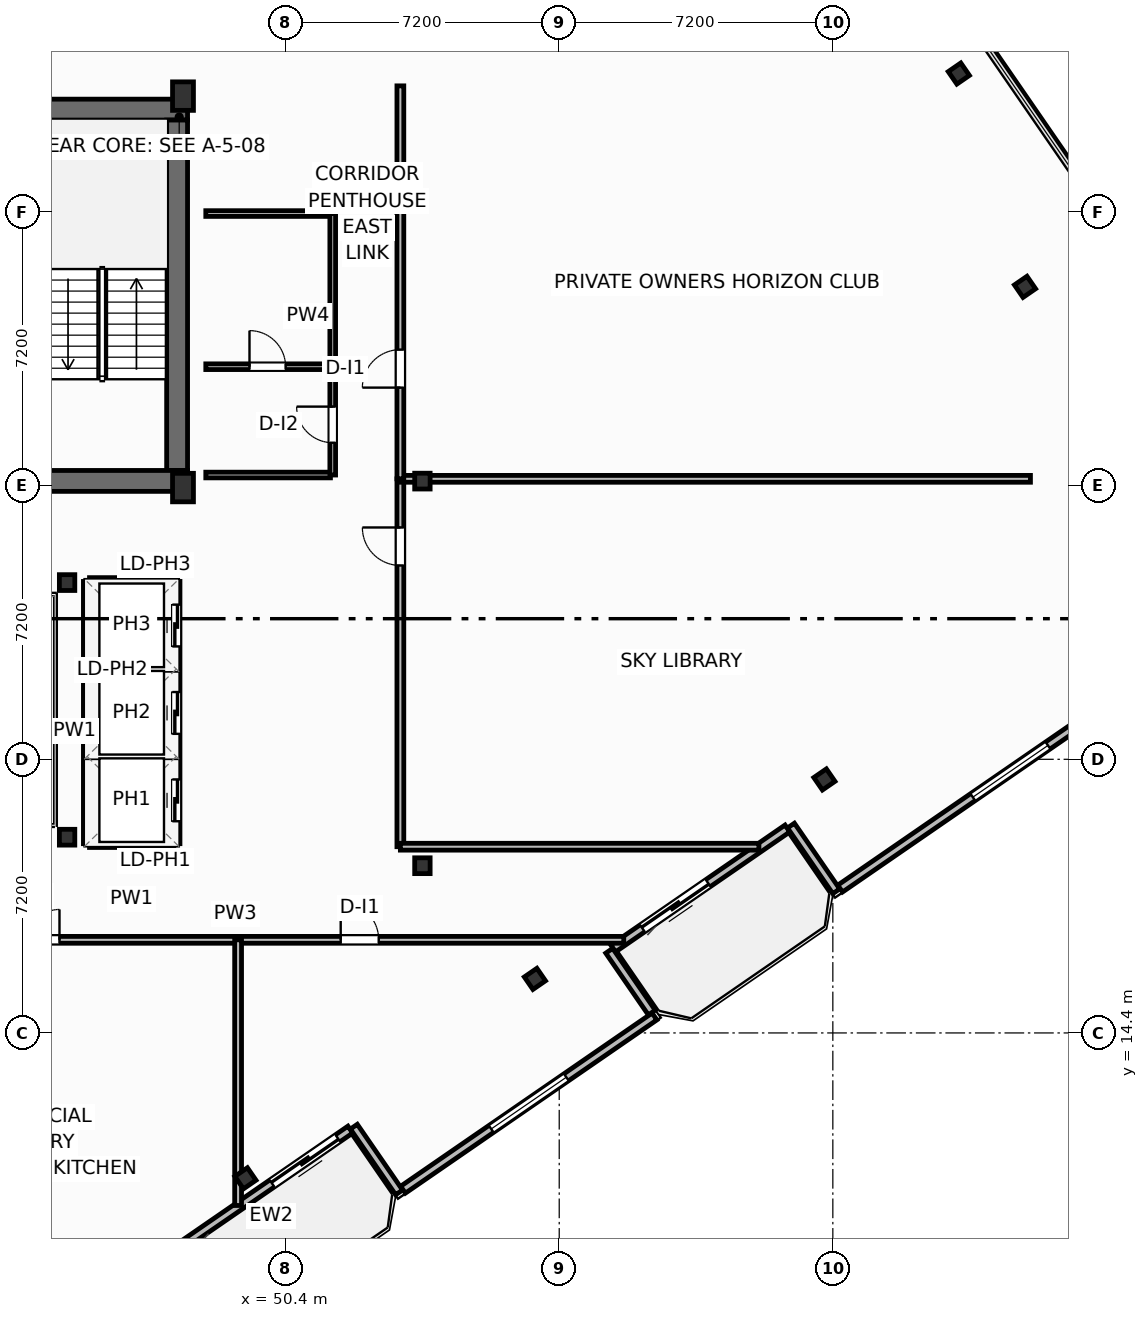
"""IFC4 building model, lengths in metres.
Left out: names, types, materials, properties, quantities, classifications, styles, units other than length and angle.
Written with IfcOpenShell. Run it as: python <this file> out.ifc"""

import sys

from ifc_helpers import new_model, si_unit, direction, frame, frame_2d, origin, origin_2d, place, context, subcontext, project, spatial, rectangle, i_section, extrude, element, fill, save


model = new_model("IFC4")
c1 = context("Model", 3, precision=1e-05, world=origin(), true_north=direction((0.0, 1.0)))
c2 = subcontext(c1, "Body", "Model", "MODEL_VIEW")
j1 = project(units=[si_unit("LENGTHUNIT", "METRE"), si_unit("PLANEANGLEUNIT", "RADIAN")], contexts=[c1])
p1 = place(None, origin())
s1 = spatial("IfcSite", under=j1, at=p1, CompositionType="ELEMENT")
p2 = place(p1, origin())
s2 = spatial("IfcBuilding", under=s1, at=p2, CompositionType="ELEMENT")
p3 = place(p2, frame((0.0, 0.0, 287.8)))
s3 = spatial("IfcBuildingStorey", under=s2, at=p3, CompositionType="ELEMENT", Elevation=287.8)
for number, where, z_axis, x_axis in (
    (1, (47.7, 28.75, 0.0), (0.0, 0.0, 1.0), (1.0, 0.0, 0.0)),
    (2, (47.7, 39.05, 0.0), (0.0, 0.0, 1.0), (1.0, 0.0, 0.0)),
):
    element("IfcColumn", number, at=place(p3, frame(where, z_axis=z_axis, x_axis=x_axis)), inside=s3, PredefinedType="COLUMN", context=c2, shape_type="SweptSolid", body=[
        extrude(rectangle(XDim=0.55, YDim=0.75, at=origin_2d()), origin(), (0.0, 0.0, 1.0), 3.7),
    ])
for number, where, z_axis, x_axis in (
    (3, (44.65, 19.55, 0.0), (0.0, 0.0, 1.0), (1.0, 0.0, 0.0)),
    (4, (44.65, 26.25, 0.0), (0.0, 0.0, 1.0), (1.0, 0.0, 0.0)),
    (5, (54.0, 18.8, 0.0), (0.0, 0.0, 1.0), (1.0, 0.0, 0.0)),
    (6, (54.0, 28.92, 0.0), (0.0, 0.0, 1.0), (1.0, 0.0, 0.0)),
):
    element("IfcColumn", number, at=place(p3, frame(where, z_axis=z_axis, x_axis=x_axis)), inside=s3, PredefinedType="COLUMN", context=c2, shape_type="SweptSolid", body=[
        extrude(i_section(OverallWidth=0.406, OverallDepth=0.416, WebThickness=0.03, FlangeThickness=0.048, FilletRadius=0.025, at=origin_2d()), origin(), (0.0, 0.0, 1.0), 3.7),
    ])
p4 = place(p3, frame((30.58, 38.695, 0.0), z_axis=(0.0, 0.0, 1.0), x_axis=(1.0, 0.0, 0.0)))
e7 = element("IfcWall", 7, at=p4, inside=s3, PredefinedType="SHEAR", context=c2, shape_type="SweptSolid", body=[
    extrude(rectangle(XDim=17.24, YDim=0.55, at=frame_2d((8.62, 0.0))), origin(), (0.0, 0.0, 1.0), 3.38),
])
p5 = place(p3, frame((47.545, 29.2, 0.0), z_axis=(0.0, 0.0, 1.0), x_axis=(0.0, 1.0, 0.0)))
e8 = element("IfcWall", 8, at=p5, inside=s3, PredefinedType="SHEAR", context=c2, shape_type="SweptSolid", body=[
    extrude(rectangle(XDim=9.22, YDim=0.55, at=frame_2d((4.61, 0.0))), origin(), (0.0, 0.0, 1.0), 3.38),
])
p6 = place(p3, frame((43.6, 28.925, 0.0), z_axis=(0.0, 0.0, 1.0), x_axis=(1.0, 0.0, 0.0)))
e9 = element("IfcWall", 9, at=p6, inside=s3, PredefinedType="SHEAR", context=c2, shape_type="SweptSolid", body=[
    extrude(rectangle(XDim=4.22, YDim=0.55, at=frame_2d((2.11, 0.0))), origin(), (0.0, 0.0, 1.0), 3.38),
])
for number, where, z_axis, x_axis in (
    (10, (49.343, 10.575, 0.0), (0.0, 0.0, 1.0), (0.824, 0.567, 0.0)),
    (11, (56.96, 15.823, 0.0), (0.0, 0.0, 1.0), (0.824, 0.567, 0.0)),
    (12, (64.578, 21.07, 0.0), (0.0, 0.0, 1.0), (0.824, 0.567, 0.0)),
    (13, (69.857, 34.031, 0.0), (0.0, 0.0, 1.0), (0.824, 0.567, 0.0)),
    (14, (68.115, 39.644, 0.0), (0.0, 0.0, 1.0), (0.824, 0.567, 0.0)),
):
    element("IfcColumn", number, at=place(p3, frame(where, z_axis=z_axis, x_axis=x_axis)), inside=s3, PredefinedType="COLUMN", context=c2, shape_type="SweptSolid", body=[
        extrude(i_section(OverallWidth=0.401, OverallDepth=0.399, WebThickness=0.025, FlangeThickness=0.04, FilletRadius=0.022, at=origin_2d()), origin(), (0.0, 0.0, 1.0), 3.7),
    ])
p7 = place(p3, frame((52.103, 11.857, 0.0), z_axis=(0.0, 0.0, 1.0), x_axis=(-0.823534636215, -0.567265989598, 0.0)))
e15 = element("IfcWall", 15, at=p7, inside=s3, PredefinedType="SOLIDWALL", context=c2, shape_type="SweptSolid", body=[
    extrude(rectangle(XDim=6.0, YDim=0.22, at=frame_2d((3.0, 0.0))), origin(), (0.0, 0.0, 1.0), 2.66),
])
p8 = place(p7, frame((0.4, 0.0, 0.0)))
e16 = element("IfcOpeningElement", 16, at=p8, cuts=e15, PredefinedType="OPENING", context=c2, shape_type="SweptSolid", body=[
    extrude(rectangle(XDim=2.1, YDim=2.3, at=frame_2d((1.05, 1.15))), frame((0.0, 0.12, 0.0), z_axis=(0.0, -1.0, 0.0), x_axis=(1.0, 0.0, 0.0)), (0.0, 0.0, 1.0), 0.24),
])
p9 = place(p3, frame((63.605, 19.78, 0.0), z_axis=(0.0, 0.0, 1.0), x_axis=(-0.823541290762, -0.567256328665, 0.0)))
e17 = element("IfcWall", 17, at=p9, inside=s3, PredefinedType="SOLIDWALL", context=c2, shape_type="SweptSolid", body=[
    extrude(rectangle(XDim=5.567, YDim=0.22, at=frame_2d((2.784, 0.0))), origin(), (0.0, 0.0, 1.0), 2.66),
])
p10 = place(p9, frame((2.534, 0.0, 0.0)))
e18 = element("IfcOpeningElement", 18, at=p10, cuts=e17, PredefinedType="OPENING", context=c2, shape_type="SweptSolid", body=[
    extrude(rectangle(XDim=2.1, YDim=2.3, at=frame_2d((1.05, 1.15))), frame((0.0, 0.12, 0.0), z_axis=(0.0, -1.0, 0.0), x_axis=(1.0, 0.0, 0.0)), (0.0, 0.0, 1.0), 0.24),
])
p11 = place(p3, frame((52.196, 11.933, 0.0), z_axis=(0.0, 0.0, 1.0), x_axis=(0.56729822855, -0.823512428494, 0.0)))
e19 = element("IfcWall", 19, at=p11, inside=s3, PredefinedType="SOLIDWALL", context=c2, shape_type="SweptSolid", body=[
    extrude(rectangle(XDim=2.1, YDim=0.22, at=frame_2d((1.05, 0.0))), origin(), (0.0, 0.0, 1.0), 2.66),
])
p12 = place(p3, frame((53.49, 10.275, 0.0), z_axis=(0.0, 0.0, 1.0), x_axis=(0.823530942962, 0.56727135128, 0.0)))
e20 = element("IfcWall", 20, at=p12, inside=s3, PredefinedType="SOLIDWALL", context=c2, shape_type="SweptSolid", body=[
    extrude(rectangle(XDim=8.035, YDim=0.22, at=frame_2d((4.018, 0.0))), origin(), (0.0, 0.0, 1.0), 2.66),
])
p13 = place(p12, frame((2.817, 0.0, 0.8)))
e21 = element("IfcOpeningElement", 21, at=p13, cuts=e20, PredefinedType="OPENING", context=c2, shape_type="SweptSolid", body=[
    extrude(rectangle(XDim=2.4, YDim=1.78, at=frame_2d((1.2, 0.89))), frame((0.0, 0.12, 0.0), z_axis=(0.0, -1.0, 0.0), x_axis=(1.0, 0.0, 0.0)), (0.0, 0.0, 1.0), 0.24),
])
p14 = place(p3, frame((60.036, 14.936, 0.0), z_axis=(0.0, 0.0, 1.0), x_axis=(-0.567273565974, 0.823529417415, 0.0)))
e22 = element("IfcWall", 22, at=p14, inside=s3, PredefinedType="SOLIDWALL", context=c2, shape_type="SweptSolid", body=[
    extrude(rectangle(XDim=1.975, YDim=0.22, at=frame_2d((0.988, 0.0))), origin(), (0.0, 0.0, 1.0), 2.66),
])
p15 = place(p3, frame((63.698, 19.856, 0.0), z_axis=(0.0, 0.0, 1.0), x_axis=(0.567219383419, -0.823566737474, 0.0)))
e23 = element("IfcWall", 23, at=p15, inside=s3, PredefinedType="SOLIDWALL", context=c2, shape_type="SweptSolid", body=[
    extrude(rectangle(XDim=2.1, YDim=0.22, at=frame_2d((1.05, 0.0))), origin(), (0.0, 0.0, 1.0), 2.66),
])
p16 = place(p3, frame((64.992, 18.198, 0.0), z_axis=(0.0, 0.0, 1.0), x_axis=(0.823538117322, 0.56726093583, 0.0)))
e24 = element("IfcWall", 24, at=p16, inside=s3, PredefinedType="SOLIDWALL", context=c2, shape_type="SweptSolid", body=[
    extrude(rectangle(XDim=10.88, YDim=0.22, at=frame_2d((5.44, 0.0))), origin(), (0.0, 0.0, 1.0), 2.66),
])
p17 = place(p16, frame((4.24, 0.0, 0.8)))
e25 = element("IfcOpeningElement", 25, at=p17, cuts=e24, PredefinedType="OPENING", context=c2, shape_type="SweptSolid", body=[
    extrude(rectangle(XDim=2.4, YDim=1.78, at=frame_2d((1.2, 0.89))), frame((0.0, 0.12, 0.0), z_axis=(0.0, -1.0, 0.0), x_axis=(1.0, 0.0, 0.0)), (0.0, 0.0, 1.0), 0.24),
])
p18 = place(p3, frame((38.85, 16.85, 0.0), z_axis=(0.0, 0.0, 1.0), x_axis=(1.0, 0.0, 0.0)))
e26 = element("IfcWall", 26, at=p18, inside=s3, PredefinedType="PARTITIONING", context=c2, shape_type="SweptSolid", body=[
    extrude(rectangle(XDim=20.448, YDim=0.18, at=frame_2d((10.224, 0.0))), origin(), (0.0, 0.0, 1.0), 3.38),
])
p19 = place(p18, frame((4.0, 0.0, 0.0)))
e27 = element("IfcOpeningElement", 27, at=p19, cuts=e26, PredefinedType="OPENING", context=c2, shape_type="SweptSolid", body=[
    extrude(rectangle(XDim=1.6, YDim=2.05, at=frame_2d((0.8, 1.025))), frame((0.0, 0.1, 0.0), z_axis=(0.0, -1.0, 0.0), x_axis=(1.0, 0.0, 0.0)), (0.0, 0.0, 1.0), 0.2),
])
p20 = place(p18, frame((13.0, 0.0, 0.0)))
e28 = element("IfcOpeningElement", 28, at=p20, cuts=e26, PredefinedType="OPENING", context=c2, shape_type="SweptSolid", body=[
    extrude(rectangle(XDim=1.0, YDim=2.05, at=frame_2d((0.5, 1.025))), frame((0.0, 0.1, 0.0), z_axis=(0.0, -1.0, 0.0), x_axis=(1.0, 0.0, 0.0)), (0.0, 0.0, 1.0), 0.2),
])
p21 = place(p3, frame((49.15, 9.86, 0.0), z_axis=(0.0, 0.0, 1.0), x_axis=(0.0, 1.0, 0.0)))
e29 = element("IfcWall", 29, at=p21, inside=s3, PredefinedType="PARTITIONING", context=c2, shape_type="SweptSolid", body=[
    extrude(rectangle(XDim=6.99, YDim=0.18, at=frame_2d((3.495, 0.0))), origin(), (0.0, 0.0, 1.0), 3.38),
])
p22 = place(p3, frame((53.42, 19.3, 0.0), z_axis=(0.0, 0.0, 1.0), x_axis=(0.0, 1.0, 0.0)))
e30 = element("IfcWall", 30, at=p22, inside=s3, PredefinedType="PARTITIONING", context=c2, shape_type="SweptSolid", body=[
    extrude(rectangle(XDim=9.68, YDim=0.18, at=frame_2d((4.84, 0.0))), origin(), (0.0, 0.0, 1.0), 3.38),
])
p23 = place(p22, frame((7.4, 0.0, 0.0)))
e31 = element("IfcOpeningElement", 31, at=p23, cuts=e30, PredefinedType="OPENING", context=c2, shape_type="SweptSolid", body=[
    extrude(rectangle(XDim=1.0, YDim=2.05, at=frame_2d((0.5, 1.025))), frame((0.0, 0.1, 0.0), z_axis=(0.0, -1.0, 0.0), x_axis=(1.0, 0.0, 0.0)), (0.0, 0.0, 1.0), 0.2),
])
p24 = place(p3, frame((53.42, 19.3, 0.0), z_axis=(0.0, 0.0, 1.0), x_axis=(1.0, 0.0, 0.0)))
e32 = element("IfcWall", 32, at=p24, inside=s3, PredefinedType="PARTITIONING", context=c2, shape_type="SweptSolid", body=[
    extrude(rectangle(XDim=9.435, YDim=0.18, at=frame_2d((4.718, 0.0))), origin(), (0.0, 0.0, 1.0), 2.669),
])
p25 = place(p3, frame((53.42, 28.98, 0.0), z_axis=(0.0, 0.0, 1.0), x_axis=(1.0, 0.0, 0.0)))
e33 = element("IfcWall", 33, at=p25, inside=s3, PredefinedType="PARTITIONING", context=c2, shape_type="SweptSolid", body=[
    extrude(rectangle(XDim=16.58, YDim=0.18, at=frame_2d((8.29, 0.0))), origin(), (0.0, 0.0, 1.0), 2.592),
])
p26 = place(p3, frame((53.42, 28.98, 0.0), z_axis=(0.0, 0.0, 1.0), x_axis=(0.0, 1.0, 0.0)))
e34 = element("IfcWall", 34, at=p26, inside=s3, PredefinedType="PARTITIONING", context=c2, shape_type="SweptSolid", body=[
    extrude(rectangle(XDim=10.34, YDim=0.18, at=frame_2d((5.17, 0.0))), origin(), (0.0, 0.0, 1.0), 3.38),
])
p27 = place(p26, frame((2.4, 0.0, 0.0)))
e35 = element("IfcOpeningElement", 35, at=p27, cuts=e34, PredefinedType="OPENING", context=c2, shape_type="SweptSolid", body=[
    extrude(rectangle(XDim=1.0, YDim=2.05, at=frame_2d((0.5, 1.025))), frame((0.0, 0.1, 0.0), z_axis=(0.0, -1.0, 0.0), x_axis=(1.0, 0.0, 0.0)), (0.0, 0.0, 1.0), 0.2),
])
p28 = place(p3, frame((48.3, 31.93, 0.0), z_axis=(0.0, 0.0, 1.0), x_axis=(1.0, 0.0, 0.0)))
e36 = element("IfcWall", 36, at=p28, inside=s3, PredefinedType="PARTITIONING", context=c2, shape_type="SweptSolid", body=[
    extrude(rectangle(XDim=3.28, YDim=0.15, at=frame_2d((1.64, 0.0))), origin(), (0.0, 0.0, 1.0), 3.38),
])
p29 = place(p28, frame((1.15, 0.0, 0.0)))
e37 = element("IfcOpeningElement", 37, at=p29, cuts=e36, PredefinedType="OPENING", context=c2, shape_type="SweptSolid", body=[
    extrude(rectangle(XDim=0.95, YDim=2.05, at=frame_2d((0.475, 1.025))), frame((0.0, 0.085, 0.0), z_axis=(0.0, -1.0, 0.0), x_axis=(1.0, 0.0, 0.0)), (0.0, 0.0, 1.0), 0.17),
])
p30 = place(p3, frame((48.3, 29.08, 0.0), z_axis=(0.0, 0.0, 1.0), x_axis=(1.0, 0.0, 0.0)))
e38 = element("IfcWall", 38, at=p30, inside=s3, PredefinedType="PARTITIONING", context=c2, shape_type="SweptSolid", body=[
    extrude(rectangle(XDim=3.28, YDim=0.15, at=frame_2d((1.64, 0.0))), origin(), (0.0, 0.0, 1.0), 2.592),
])
p31 = place(p3, frame((48.3, 35.96, 0.0), z_axis=(0.0, 0.0, 1.0), x_axis=(1.0, 0.0, 0.0)))
e39 = element("IfcWall", 39, at=p31, inside=s3, PredefinedType="PARTITIONING", context=c2, shape_type="SweptSolid", body=[
    extrude(rectangle(XDim=3.28, YDim=0.15, at=frame_2d((1.64, 0.0))), origin(), (0.0, 0.0, 1.0), 3.38),
])
p32 = place(p3, frame((51.64, 29.08, 0.0), z_axis=(0.0, 0.0, 1.0), x_axis=(0.0, 1.0, 0.0)))
e40 = element("IfcWall", 40, at=p32, inside=s3, PredefinedType="PARTITIONING", context=c2, shape_type="SweptSolid", body=[
    extrude(rectangle(XDim=6.88, YDim=0.15, at=frame_2d((3.44, 0.0))), origin(), (0.0, 0.0, 1.0), 3.38),
])
p33 = place(p32, frame((0.85, 0.0, 0.0)))
e41 = element("IfcOpeningElement", 41, at=p33, cuts=e40, PredefinedType="OPENING", context=c2, shape_type="SweptSolid", body=[
    extrude(rectangle(XDim=0.95, YDim=2.05, at=frame_2d((0.475, 1.025))), frame((0.0, 0.085, 0.0), z_axis=(0.0, -1.0, 0.0), x_axis=(1.0, 0.0, 0.0)), (0.0, 0.0, 1.0), 0.17),
])
for number, where, z_axis, x_axis in (
    (42, (45.24, 21.675, 0.0), (0.0, 0.0, 1.0), (1.0, 0.0, 0.0)),
    (43, (45.24, 23.975, 0.0), (0.0, 0.0, 1.0), (1.0, 0.0, 0.0)),
):
    element("IfcWall", number, at=place(p3, frame(where, z_axis=z_axis, x_axis=x_axis)), inside=s3, PredefinedType="PARTITIONING", context=c2, shape_type="SweptSolid", body=[
        extrude(rectangle(XDim=2.22, YDim=0.2, at=frame_2d((1.11, 0.0))), origin(), (0.0, 0.0, 1.0), 3.38),
    ])
p34 = place(p3, frame((45.24, 19.38, 0.0), z_axis=(0.0, 0.0, 1.0), x_axis=(1.0, 0.0, 0.0)))
e44 = element("IfcWall", 44, at=p34, inside=s3, PredefinedType="PARTITIONING", context=c2, shape_type="SweptSolid", body=[
    extrude(rectangle(XDim=2.22, YDim=0.2, at=frame_2d((1.11, 0.0))), origin(), (0.0, 0.0, 1.0), 2.592),
])
p35 = place(p3, frame((45.24, 26.28, 0.0), z_axis=(0.0, 0.0, 1.0), x_axis=(1.0, 0.0, 0.0)))
e45 = element("IfcWall", 45, at=p35, inside=s3, PredefinedType="PARTITIONING", context=c2, shape_type="SweptSolid", body=[
    extrude(rectangle(XDim=2.22, YDim=0.2, at=frame_2d((1.11, 0.0))), origin(), (0.0, 0.0, 1.0), 3.38),
])
p36 = place(p3, frame((45.18, 19.38, 0.0), z_axis=(0.0, 0.0, 1.0), x_axis=(0.0, 1.0, 0.0)))
e46 = element("IfcWall", 46, at=p36, inside=s3, PredefinedType="PARTITIONING", context=c2, shape_type="SweptSolid", body=[
    extrude(rectangle(XDim=6.9, YDim=0.2, at=frame_2d((3.45, 0.0))), origin(), (0.0, 0.0, 1.0), 3.38),
])
p37 = place(p3, frame((47.52, 19.38, 0.0), z_axis=(0.0, 0.0, 1.0), x_axis=(0.0, 1.0, 0.0)))
e47 = element("IfcWall", 47, at=p37, inside=s3, PredefinedType="PARTITIONING", context=c2, shape_type="SweptSolid", body=[
    extrude(rectangle(XDim=6.9, YDim=0.2, at=frame_2d((3.45, 0.0))), origin(), (0.0, 0.0, 1.0), 3.38),
])
p38 = place(p37, frame((0.59, 0.0, 0.0)))
e48 = element("IfcOpeningElement", 48, at=p38, cuts=e47, PredefinedType="OPENING", context=c2, shape_type="SweptSolid", body=[
    extrude(rectangle(XDim=1.1, YDim=2.15, at=frame_2d((0.55, 1.075))), frame((0.0, 0.11, 0.0), z_axis=(0.0, -1.0, 0.0), x_axis=(1.0, 0.0, 0.0)), (0.0, 0.0, 1.0), 0.22),
])
p39 = place(p37, frame((2.89, 0.0, 0.0)))
e49 = element("IfcOpeningElement", 49, at=p39, cuts=e47, PredefinedType="OPENING", context=c2, shape_type="SweptSolid", body=[
    extrude(rectangle(XDim=1.1, YDim=2.15, at=frame_2d((0.55, 1.075))), frame((0.0, 0.11, 0.0), z_axis=(0.0, -1.0, 0.0), x_axis=(1.0, 0.0, 0.0)), (0.0, 0.0, 1.0), 0.22),
])
p40 = place(p37, frame((5.19, 0.0, 0.0)))
e50 = element("IfcOpeningElement", 50, at=p40, cuts=e47, PredefinedType="OPENING", context=c2, shape_type="SweptSolid", body=[
    extrude(rectangle(XDim=1.1, YDim=2.15, at=frame_2d((0.55, 1.075))), frame((0.0, 0.11, 0.0), z_axis=(0.0, -1.0, 0.0), x_axis=(1.0, 0.0, 0.0)), (0.0, 0.0, 1.0), 0.22),
])
p41 = place(p8, origin())
e51 = element("IfcDoor", 51, at=p41, inside=s3, OperationType="SLIDING_TO_LEFT", PredefinedType="DOOR", context=c2, shape_type="SweptSolid", body=[
    extrude(rectangle(XDim=2.1, YDim=2.3, at=frame_2d((1.05, 1.15))), frame((0.0, 0.025, 0.0), z_axis=(0.0, -1.0, 0.0), x_axis=(1.0, 0.0, 0.0)), (0.0, 0.0, 1.0), 0.05),
])
fill(e16, e51)
p42 = place(p10, origin())
e52 = element("IfcDoor", 52, at=p42, inside=s3, OperationType="SLIDING_TO_LEFT", PredefinedType="DOOR", context=c2, shape_type="SweptSolid", body=[
    extrude(rectangle(XDim=2.1, YDim=2.3, at=frame_2d((1.05, 1.15))), frame((0.0, 0.025, 0.0), z_axis=(0.0, -1.0, 0.0), x_axis=(1.0, 0.0, 0.0)), (0.0, 0.0, 1.0), 0.05),
])
fill(e18, e52)
p43 = place(p13, origin())
e53 = element("IfcWindow", 53, at=p43, inside=s3, PartitioningType="SINGLE_PANEL", PredefinedType="WINDOW", context=c2, shape_type="SweptSolid", body=[
    extrude(rectangle(XDim=2.4, YDim=1.78, at=frame_2d((1.2, 0.89))), frame((0.0, 0.03, 0.0), z_axis=(0.0, -1.0, 0.0), x_axis=(1.0, 0.0, 0.0)), (0.0, 0.0, 1.0), 0.06),
])
fill(e21, e53)
p44 = place(p17, origin())
e54 = element("IfcWindow", 54, at=p44, inside=s3, PartitioningType="SINGLE_PANEL", PredefinedType="WINDOW", context=c2, shape_type="SweptSolid", body=[
    extrude(rectangle(XDim=2.4, YDim=1.78, at=frame_2d((1.2, 0.89))), frame((0.0, 0.03, 0.0), z_axis=(0.0, -1.0, 0.0), x_axis=(1.0, 0.0, 0.0)), (0.0, 0.0, 1.0), 0.06),
])
fill(e25, e54)
p45 = place(p19, origin())
e55 = element("IfcDoor", 55, at=p45, inside=s3, OperationType="DOUBLE_DOOR_SINGLE_SWING", PredefinedType="DOOR", context=c2, shape_type="SweptSolid", body=[
    extrude(rectangle(XDim=1.6, YDim=2.05, at=frame_2d((0.8, 1.025))), frame((0.0, 0.025, 0.0), z_axis=(0.0, -1.0, 0.0), x_axis=(1.0, 0.0, 0.0)), (0.0, 0.0, 1.0), 0.05),
])
fill(e27, e55)
p46 = place(p20, origin())
e56 = element("IfcDoor", 56, at=p46, inside=s3, OperationType="SINGLE_SWING_LEFT", PredefinedType="DOOR", context=c2, shape_type="SweptSolid", body=[
    extrude(rectangle(XDim=1.0, YDim=2.05, at=frame_2d((0.5, 1.025))), frame((0.0, 0.025, 0.0), z_axis=(0.0, -1.0, 0.0), x_axis=(1.0, 0.0, 0.0)), (0.0, 0.0, 1.0), 0.05),
])
fill(e28, e56)
p47 = place(p23, origin())
e57 = element("IfcDoor", 57, at=p47, inside=s3, OperationType="SINGLE_SWING_RIGHT", PredefinedType="DOOR", context=c2, shape_type="SweptSolid", body=[
    extrude(rectangle(XDim=1.0, YDim=2.05, at=frame_2d((0.5, 1.025))), frame((0.0, 0.025, 0.0), z_axis=(0.0, -1.0, 0.0), x_axis=(1.0, 0.0, 0.0)), (0.0, 0.0, 1.0), 0.05),
])
fill(e31, e57)
p48 = place(p27, origin())
e58 = element("IfcDoor", 58, at=p48, inside=s3, OperationType="SINGLE_SWING_LEFT", PredefinedType="DOOR", context=c2, shape_type="SweptSolid", body=[
    extrude(rectangle(XDim=1.0, YDim=2.05, at=frame_2d((0.5, 1.025))), frame((0.0, 0.025, 0.0), z_axis=(0.0, -1.0, 0.0), x_axis=(1.0, 0.0, 0.0)), (0.0, 0.0, 1.0), 0.05),
])
fill(e35, e58)
p49 = place(p29, origin())
e59 = element("IfcDoor", 59, at=p49, inside=s3, OperationType="SINGLE_SWING_LEFT", PredefinedType="DOOR", context=c2, shape_type="SweptSolid", body=[
    extrude(rectangle(XDim=0.95, YDim=2.05, at=frame_2d((0.475, 1.025))), frame((0.0, 0.025, 0.0), z_axis=(0.0, -1.0, 0.0), x_axis=(1.0, 0.0, 0.0)), (0.0, 0.0, 1.0), 0.05),
])
fill(e37, e59)
p50 = place(p33, origin())
e60 = element("IfcDoor", 60, at=p50, inside=s3, OperationType="SINGLE_SWING_RIGHT", PredefinedType="DOOR", context=c2, shape_type="SweptSolid", body=[
    extrude(rectangle(XDim=0.95, YDim=2.05, at=frame_2d((0.475, 1.025))), frame((0.0, 0.025, 0.0), z_axis=(0.0, -1.0, 0.0), x_axis=(1.0, 0.0, 0.0)), (0.0, 0.0, 1.0), 0.05),
])
fill(e41, e60)
p51 = place(p38, origin())
e61 = element("IfcDoor", 61, at=p51, inside=s3, OperationType="SLIDING_TO_LEFT", PredefinedType="DOOR", context=c2, shape_type="SweptSolid", body=[
    extrude(rectangle(XDim=1.1, YDim=2.15, at=frame_2d((0.55, 1.075))), frame((0.0, 0.025, 0.0), z_axis=(0.0, -1.0, 0.0), x_axis=(1.0, 0.0, 0.0)), (0.0, 0.0, 1.0), 0.05),
])
fill(e48, e61)
p52 = place(p39, origin())
e62 = element("IfcDoor", 62, at=p52, inside=s3, OperationType="SLIDING_TO_LEFT", PredefinedType="DOOR", context=c2, shape_type="SweptSolid", body=[
    extrude(rectangle(XDim=1.1, YDim=2.15, at=frame_2d((0.55, 1.075))), frame((0.0, 0.025, 0.0), z_axis=(0.0, -1.0, 0.0), x_axis=(1.0, 0.0, 0.0)), (0.0, 0.0, 1.0), 0.05),
])
fill(e49, e62)
p53 = place(p40, origin())
e63 = element("IfcDoor", 63, at=p53, inside=s3, OperationType="SLIDING_TO_LEFT", PredefinedType="DOOR", context=c2, shape_type="SweptSolid", body=[
    extrude(rectangle(XDim=1.1, YDim=2.15, at=frame_2d((0.55, 1.075))), frame((0.0, 0.025, 0.0), z_axis=(0.0, -1.0, 0.0), x_axis=(1.0, 0.0, 0.0)), (0.0, 0.0, 1.0), 0.05),
])
fill(e50, e63)
save(model, sys.argv[1])
